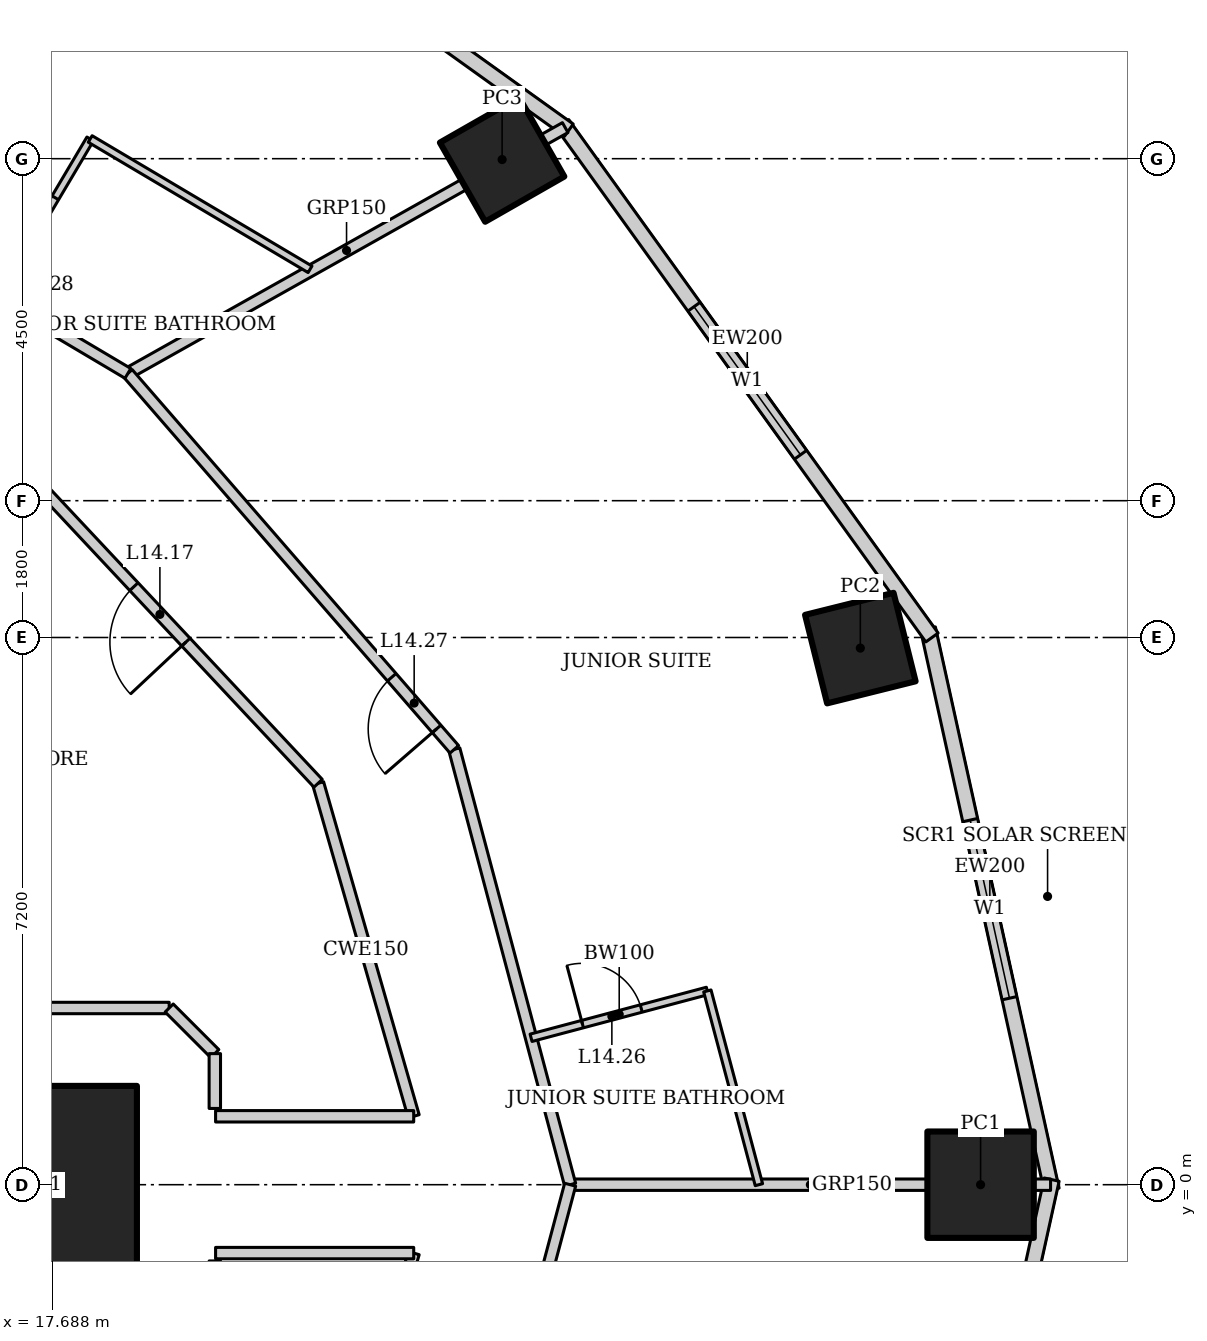
"""IFC4 building model, lengths in metres.
Left out: names, types, materials, properties, quantities, classifications, styles, units other than length and angle.
Written with IfcOpenShell. Run it as: python <this file> out.ifc"""

import sys

from ifc_helpers import new_model, si_unit, direction, frame, frame_2d, origin, origin_2d, place, context, subcontext, project, spatial, rectangle, hollow_rectangle, extrude, element, fill, save


model = new_model("IFC4")
c1 = context("Model", 3, precision=1e-05, world=origin(), true_north=direction((0.0, 1.0)))
c2 = subcontext(c1, "Body", "Model", "MODEL_VIEW")
j1 = project(units=[si_unit("LENGTHUNIT", "METRE"), si_unit("PLANEANGLEUNIT", "RADIAN")], contexts=[c1])
p1 = place(None, origin())
s1 = spatial("IfcSite", under=j1, at=p1, CompositionType="ELEMENT")
p2 = place(p1, origin())
s2 = spatial("IfcBuilding", under=s1, at=p2, CompositionType="ELEMENT")
p3 = place(p2, frame((0.0, 0.0, 65.8)))
s3 = spatial("IfcBuildingStorey", under=s2, at=p3, CompositionType="ELEMENT", Elevation=65.8)
p4 = place(p3, frame((17.5, 0.0, 0.0), z_axis=(0.0, 0.0, 1.0), x_axis=(1.0, 0.0, 0.0)))
e1 = element("IfcColumn", 1, at=p4, inside=s3, PredefinedType="COLUMN", context=c2, shape_type="SweptSolid", body=[
    extrude(hollow_rectangle(XDim=2.6, YDim=2.6, WallThickness=0.13, at=origin_2d()), origin(), (0.0, 0.0, 1.0), 3.6),
])
p5 = place(p3, frame((29.9, 0.0, 0.0), z_axis=(0.0, 0.0, 1.0), x_axis=(1.0, 0.0, 0.0)))
e2 = element("IfcColumn", 2, at=p5, inside=s3, PredefinedType="COLUMN", context=c2, shape_type="SweptSolid", body=[
    extrude(hollow_rectangle(XDim=1.4, YDim=1.4, WallThickness=0.1, at=origin_2d()), origin(), (0.0, 0.0, 1.0), 3.6),
])
p6 = place(p3, frame((28.318, 7.06, 0.0), z_axis=(0.0, 0.0, 1.0), x_axis=(0.970295726276, 0.2419218956, 0.0)))
e3 = element("IfcColumn", 3, at=p6, inside=s3, PredefinedType="COLUMN", context=c2, shape_type="SweptSolid", body=[
    extrude(hollow_rectangle(XDim=1.2, YDim=1.2, WallThickness=0.1, at=origin_2d()), origin(), (0.0, 0.0, 1.0), 3.6),
])
p7 = place(p3, frame((23.605, 13.489, 0.0), z_axis=(0.0, 0.0, 1.0), x_axis=(0.86824298017, 0.496139221777, 0.0)))
e4 = element("IfcColumn", 4, at=p7, inside=s3, PredefinedType="COLUMN", context=c2, shape_type="SweptSolid", body=[
    extrude(hollow_rectangle(XDim=1.2, YDim=1.2, WallThickness=0.12, at=origin_2d()), origin(), (0.0, 0.0, 1.0), 3.6),
])
p8 = place(p3, frame((30.835, -0.067, 0.0), z_axis=(0.0, 0.0, 1.0), x_axis=(-0.215238065514, 0.976561608478, 0.0)))
e5 = element("IfcWall", 5, at=p8, inside=s3, PredefinedType="SOLIDWALL", context=c2, shape_type="SweptSolid", body=[
    extrude(rectangle(XDim=7.562, YDim=0.2, at=frame_2d((3.781, 0.0))), origin(), (0.0, 0.0, 1.0), 3.4),
])
p9 = place(p8, frame((2.581, 0.0, 0.5)))
e6 = element("IfcOpeningElement", 6, at=p9, cuts=e5, PredefinedType="OPENING", context=c2, shape_type="SweptSolid", body=[
    extrude(rectangle(XDim=2.4, YDim=2.2, at=frame_2d((1.2, 1.1))), frame((0.0, 0.11, 0.0), z_axis=(0.0, -1.0, 0.0), x_axis=(1.0, 0.0, 0.0)), (0.0, 0.0, 1.0), 0.22),
])
p10 = place(p3, frame((29.26, 7.2, 0.0), z_axis=(0.0, 0.0, 1.0), x_axis=(-0.583937613703, 0.811798536155, 0.0)))
e7 = element("IfcWall", 7, at=p10, inside=s3, PredefinedType="SOLIDWALL", context=c2, shape_type="SweptSolid", body=[
    extrude(rectangle(XDim=8.323, YDim=0.2, at=frame_2d((4.162, 0.0))), origin(), (0.0, 0.0, 1.0), 3.4),
])
p11 = place(p10, frame((2.961, 0.0, 0.5)))
e8 = element("IfcOpeningElement", 8, at=p11, cuts=e7, PredefinedType="OPENING", context=c2, shape_type="SweptSolid", body=[
    extrude(rectangle(XDim=2.4, YDim=2.2, at=frame_2d((1.2, 1.1))), frame((0.0, 0.11, 0.0), z_axis=(0.0, -1.0, 0.0), x_axis=(1.0, 0.0, 0.0)), (0.0, 0.0, 1.0), 0.22),
])
p12 = place(p3, frame((24.482, 13.875, 0.0), z_axis=(0.0, 0.0, 1.0), x_axis=(-0.812791321576, 0.582554948112, 0.0)))
e9 = element("IfcWall", 9, at=p12, inside=s3, PredefinedType="SOLIDWALL", context=c2, shape_type="SweptSolid", body=[
    extrude(rectangle(XDim=8.063, YDim=0.2, at=frame_2d((4.032, 0.0))), origin(), (0.0, 0.0, 1.0), 3.4),
])
p13 = place(p12, frame((2.832, 0.0, 0.5)))
e10 = element("IfcOpeningElement", 10, at=p13, cuts=e9, PredefinedType="OPENING", context=c2, shape_type="SweptSolid", body=[
    extrude(rectangle(XDim=2.4, YDim=2.2, at=frame_2d((1.2, 1.1))), frame((0.0, 0.11, 0.0), z_axis=(0.0, -1.0, 0.0), x_axis=(1.0, 0.0, 0.0)), (0.0, 0.0, 1.0), 0.22),
])
p14 = place(p3, frame((29.208, -7.318, 0.0), z_axis=(0.0, 0.0, 1.0), x_axis=(0.215238065514, 0.976561608478, 0.0)))
e11 = element("IfcWall", 11, at=p14, inside=s3, PredefinedType="SOLIDWALL", context=c2, shape_type="SweptSolid", body=[
    extrude(rectangle(XDim=7.562, YDim=0.2, at=frame_2d((3.781, 0.0))), origin(), (0.0, 0.0, 1.0), 3.4),
])
p15 = place(p14, frame((2.581, 0.0, 0.5)))
e12 = element("IfcOpeningElement", 12, at=p15, cuts=e11, PredefinedType="OPENING", context=c2, shape_type="SweptSolid", body=[
    extrude(rectangle(XDim=2.4, YDim=2.2, at=frame_2d((1.2, 1.1))), frame((0.0, 0.11, 0.0), z_axis=(0.0, -1.0, 0.0), x_axis=(1.0, 0.0, 0.0)), (0.0, 0.0, 1.0), 0.22),
])
p16 = place(p3, frame((30.821, 0.0, 0.0), z_axis=(0.0, 0.0, 1.0), x_axis=(-1.0, 0.0, 0.0)))
e13 = element("IfcWall", 13, at=p16, inside=s3, PredefinedType="PARTITIONING", context=c2, shape_type="SweptSolid", body=[
    extrude(rectangle(XDim=6.321, YDim=0.15, at=frame_2d((3.16, 0.0))), origin(), (0.0, 0.0, 1.0), 2.528),
])
p17 = place(p3, frame((24.435, 13.909, 0.0), z_axis=(0.0, 0.0, 1.0), x_axis=(-0.871747379892, -0.489955616001, 0.0)))
e14 = element("IfcWall", 14, at=p17, inside=s3, PredefinedType="PARTITIONING", context=c2, shape_type="SweptSolid", body=[
    extrude(rectangle(XDim=6.6, YDim=0.15, at=frame_2d((3.3, 0.0))), origin(), (0.0, 0.0, 1.0), 2.693),
])
p18 = place(p3, frame((24.5, 0.0, 0.0), z_axis=(0.0, 0.0, 1.0), x_axis=(-0.257083265334, 0.966389256296, 0.0)))
e15 = element("IfcWall", 15, at=p18, inside=s3, PredefinedType="PARTITIONING", context=c2, shape_type="SweptSolid", body=[
    extrude(rectangle(XDim=5.928, YDim=0.15, at=frame_2d((2.964, 0.0))), origin(), (0.0, 0.0, 1.0), 3.45),
])
p19 = place(p3, frame((22.976, 5.729, 0.0), z_axis=(0.0, 0.0, 1.0), x_axis=(-0.655599989166, 0.755108372491, 0.0)))
e16 = element("IfcWall", 16, at=p19, inside=s3, PredefinedType="PARTITIONING", context=c2, shape_type="SweptSolid", body=[
    extrude(rectangle(XDim=6.551, YDim=0.15, at=frame_2d((3.275, 0.0))), origin(), (0.0, 0.0, 1.0), 3.45),
])
p20 = place(p19, frame((0.356, 0.0, 0.0)))
e17 = element("IfcOpeningElement", 17, at=p20, cuts=e16, PredefinedType="OPENING", context=c2, shape_type="SweptSolid", body=[
    extrude(rectangle(XDim=0.9, YDim=2.1, at=frame_2d((0.45, 1.05))), frame((0.0, 0.085, 0.0), z_axis=(0.0, -1.0, 0.0), x_axis=(1.0, 0.0, 0.0)), (0.0, 0.0, 1.0), 0.17),
])
p21 = place(p3, frame((18.681, 10.675, 0.0), z_axis=(0.0, 0.0, 1.0), x_axis=(-0.860147339762, 0.510045639036, 0.0)))
e18 = element("IfcWall", 18, at=p21, inside=s3, PredefinedType="PARTITIONING", context=c2, shape_type="SweptSolid", body=[
    extrude(rectangle(XDim=6.19, YDim=0.15, at=frame_2d((3.095, 0.0))), origin(), (0.0, 0.0, 1.0), 3.45),
])
p22 = place(p3, frame((22.976, -5.729, 0.0), z_axis=(0.0, 0.0, 1.0), x_axis=(0.257083265334, 0.966389256296, 0.0)))
e19 = element("IfcWall", 19, at=p22, inside=s3, PredefinedType="PARTITIONING", context=c2, shape_type="SweptSolid", body=[
    extrude(rectangle(XDim=5.928, YDim=0.15, at=frame_2d((2.964, 0.0))), origin(), (0.0, 0.0, 1.0), 3.45),
])
p23 = place(p22, frame((1.794, 0.0, 0.0)))
e20 = element("IfcOpeningElement", 20, at=p23, cuts=e19, PredefinedType="OPENING", context=c2, shape_type="SweptSolid", body=[
    extrude(rectangle(XDim=0.9, YDim=2.1, at=frame_2d((0.45, 1.05))), frame((0.0, 0.085, 0.0), z_axis=(0.0, -1.0, 0.0), x_axis=(1.0, 0.0, 0.0)), (0.0, 0.0, 1.0), 0.17),
])
p24 = place(p3, frame((22.442, 0.9, 0.0), z_axis=(0.0, 0.0, 1.0), x_axis=(-0.27585972825, 0.961197903831, 0.0)))
e21 = element("IfcWall", 21, at=p24, inside=s3, PredefinedType="PARTITIONING", context=c2, shape_type="SweptSolid", body=[
    extrude(rectangle(XDim=4.559, YDim=0.15, at=frame_2d((2.279, 0.0))), origin(), (0.0, 0.0, 1.0), 3.45),
])
p25 = place(p3, frame((21.184, 5.282, 0.0), z_axis=(0.0, 0.0, 1.0), x_axis=(-0.68365836236, 0.729802194828, 0.0)))
e22 = element("IfcWall", 22, at=p25, inside=s3, PredefinedType="PARTITIONING", context=c2, shape_type="SweptSolid", body=[
    extrude(rectangle(XDim=6.09, YDim=0.15, at=frame_2d((3.045, 0.0))), origin(), (0.0, 0.0, 1.0), 3.45),
])
p26 = place(p25, frame((2.545, 0.0, 0.0)))
e23 = element("IfcOpeningElement", 23, at=p26, cuts=e22, PredefinedType="OPENING", context=c2, shape_type="SweptSolid", body=[
    extrude(rectangle(XDim=1.0, YDim=2.1, at=frame_2d((0.5, 1.05))), frame((0.0, 0.085, 0.0), z_axis=(0.0, -1.0, 0.0), x_axis=(1.0, 0.0, 0.0)), (0.0, 0.0, 1.0), 0.17),
])
p27 = place(p3, frame((21.184, -5.282, 0.0), z_axis=(0.0, 0.0, 1.0), x_axis=(0.27585972825, 0.961197903831, 0.0)))
e24 = element("IfcWall", 24, at=p27, inside=s3, PredefinedType="PARTITIONING", context=c2, shape_type="SweptSolid", body=[
    extrude(rectangle(XDim=4.559, YDim=0.15, at=frame_2d((2.279, 0.0))), origin(), (0.0, 0.0, 1.0), 3.45),
])
p28 = place(p3, frame((23.986, 1.933, 0.0), z_axis=(0.0, 0.0, 1.0), x_axis=(0.96639514992, 0.257061109879, 0.0)))
e25 = element("IfcWall", 25, at=p28, inside=s3, PredefinedType="PARTITIONING", context=c2, shape_type="SweptSolid", body=[
    extrude(rectangle(XDim=2.4, YDim=0.1, at=frame_2d((1.2, 0.0))), origin(), (0.0, 0.0, 1.0), 3.45),
])
p29 = place(p28, frame((0.7, 0.0, 0.0)))
e26 = element("IfcOpeningElement", 26, at=p29, cuts=e25, PredefinedType="OPENING", context=c2, shape_type="SweptSolid", body=[
    extrude(rectangle(XDim=0.8, YDim=2.1, at=frame_2d((0.4, 1.05))), frame((0.0, 0.06, 0.0), z_axis=(0.0, -1.0, 0.0), x_axis=(1.0, 0.0, 0.0)), (0.0, 0.0, 1.0), 0.12),
])
p30 = place(p3, frame((26.305, 2.55, 0.0), z_axis=(0.0, 0.0, 1.0), x_axis=(0.257052122515, -0.966397540513, 0.0)))
e27 = element("IfcWall", 27, at=p30, inside=s3, PredefinedType="PARTITIONING", context=c2, shape_type="SweptSolid", body=[
    extrude(rectangle(XDim=2.638, YDim=0.1, at=frame_2d((1.319, 0.0))), origin(), (0.0, 0.0, 1.0), 3.45),
])
p31 = place(p3, frame((16.961, 11.695, 0.0), z_axis=(0.0, 0.0, 1.0), x_axis=(0.510075642074, 0.860129548012, 0.0)))
e28 = element("IfcWall", 28, at=p31, inside=s3, PredefinedType="PARTITIONING", context=c2, shape_type="SweptSolid", body=[
    extrude(rectangle(XDim=2.4, YDim=0.1, at=frame_2d((1.2, 0.0))), origin(), (0.0, 0.0, 1.0), 3.45),
])
p32 = place(p31, frame((0.7, 0.0, 0.0)))
e29 = element("IfcOpeningElement", 29, at=p32, cuts=e28, PredefinedType="OPENING", context=c2, shape_type="SweptSolid", body=[
    extrude(rectangle(XDim=0.8, YDim=2.1, at=frame_2d((0.4, 1.05))), frame((0.0, 0.06, 0.0), z_axis=(0.0, -1.0, 0.0), x_axis=(1.0, 0.0, 0.0)), (0.0, 0.0, 1.0), 0.12),
])
p33 = place(p3, frame((18.185, 13.76, 0.0), z_axis=(0.0, 0.0, 1.0), x_axis=(0.860146437071, -0.510047161343, 0.0)))
e30 = element("IfcWall", 30, at=p33, inside=s3, PredefinedType="PARTITIONING", context=c2, shape_type="SweptSolid", body=[
    extrude(rectangle(XDim=3.363, YDim=0.1, at=frame_2d((1.681, 0.0))), origin(), (0.0, 0.0, 1.0), 3.45),
])
for number, where, z_axis, x_axis in (
    (31, (19.835, -0.9, 0.0), (0.0, 0.0, 1.0), (1.0, 0.0, 0.0)),
    (32, (19.835, 0.9, 0.0), (0.0, 0.0, 1.0), (1.0, 0.0, 0.0)),
):
    element("IfcWall", number, at=place(p3, frame(where, z_axis=z_axis, x_axis=x_axis)), inside=s3, PredefinedType="PARTITIONING", context=c2, shape_type="SweptSolid", body=[
        extrude(rectangle(XDim=2.607, YDim=0.15, at=frame_2d((1.303, 0.0))), origin(), (0.0, 0.0, 1.0), 3.45),
    ])
p34 = place(p3, frame((15.775, 2.325, 0.0), z_axis=(0.0, 0.0, 1.0), x_axis=(1.0, 0.0, 0.0)))
e33 = element("IfcWall", 33, at=p34, inside=s3, PredefinedType="PARTITIONING", context=c2, shape_type="SweptSolid", body=[
    extrude(rectangle(XDim=3.449, YDim=0.15, at=frame_2d((1.725, 0.0))), origin(), (0.0, 0.0, 1.0), 3.45),
])
p35 = place(p3, frame((19.225, 2.325, 0.0), z_axis=(0.0, 0.0, 1.0), x_axis=(0.707106781187, -0.707106781187, 0.0)))
e34 = element("IfcWall", 34, at=p35, inside=s3, PredefinedType="PARTITIONING", context=c2, shape_type="SweptSolid", body=[
    extrude(rectangle(XDim=0.849, YDim=0.15, at=frame_2d((0.425, 0.0))), origin(), (0.0, 0.0, 1.0), 3.45),
])
p36 = place(p3, frame((19.825, 1.725, 0.0), z_axis=(0.0, 0.0, 1.0), x_axis=(0.0, -1.0, 0.0)))
e35 = element("IfcWall", 35, at=p36, inside=s3, PredefinedType="PARTITIONING", context=c2, shape_type="SweptSolid", body=[
    extrude(rectangle(XDim=0.721, YDim=0.15, at=frame_2d((0.361, 0.0))), origin(), (0.0, 0.0, 1.0), 3.45),
])
p37 = place(p9, origin())
e36 = element("IfcWindow", 36, at=p37, inside=s3, PartitioningType="SINGLE_PANEL", PredefinedType="WINDOW", context=c2, shape_type="SweptSolid", body=[
    extrude(rectangle(XDim=2.4, YDim=2.2, at=frame_2d((1.2, 1.1))), frame((0.0, 0.03, 0.0), z_axis=(0.0, -1.0, 0.0), x_axis=(1.0, 0.0, 0.0)), (0.0, 0.0, 1.0), 0.06),
])
fill(e6, e36)
p38 = place(p11, origin())
e37 = element("IfcWindow", 37, at=p38, inside=s3, PartitioningType="SINGLE_PANEL", PredefinedType="WINDOW", context=c2, shape_type="SweptSolid", body=[
    extrude(rectangle(XDim=2.4, YDim=2.2, at=frame_2d((1.2, 1.1))), frame((0.0, 0.03, 0.0), z_axis=(0.0, -1.0, 0.0), x_axis=(1.0, 0.0, 0.0)), (0.0, 0.0, 1.0), 0.06),
])
fill(e8, e37)
p39 = place(p26, origin())
e38 = element("IfcDoor", 38, at=p39, inside=s3, OperationType="SINGLE_SWING_LEFT", PredefinedType="DOOR", context=c2, shape_type="SweptSolid", body=[
    extrude(rectangle(XDim=1.0, YDim=2.1, at=frame_2d((0.5, 1.05))), frame((0.0, 0.025, 0.0), z_axis=(0.0, -1.0, 0.0), x_axis=(1.0, 0.0, 0.0)), (0.0, 0.0, 1.0), 0.05),
])
fill(e23, e38)
p40 = place(p29, origin())
e39 = element("IfcDoor", 39, at=p40, inside=s3, OperationType="SINGLE_SWING_LEFT", PredefinedType="DOOR", context=c2, shape_type="SweptSolid", body=[
    extrude(rectangle(XDim=0.8, YDim=2.1, at=frame_2d((0.4, 1.05))), frame((0.0, 0.025, 0.0), z_axis=(0.0, -1.0, 0.0), x_axis=(1.0, 0.0, 0.0)), (0.0, 0.0, 1.0), 0.05),
])
fill(e26, e39)
p41 = place(p20, origin())
e40 = element("IfcDoor", 40, at=p41, inside=s3, OperationType="SINGLE_SWING_LEFT", PredefinedType="DOOR", context=c2, shape_type="SweptSolid", body=[
    extrude(rectangle(XDim=0.9, YDim=2.1, at=frame_2d((0.45, 1.05))), frame((0.0, 0.025, 0.0), z_axis=(0.0, -1.0, 0.0), x_axis=(1.0, 0.0, 0.0)), (0.0, 0.0, 1.0), 0.05),
])
fill(e17, e40)
p42 = place(p32, origin())
e41 = element("IfcDoor", 41, at=p42, inside=s3, OperationType="SINGLE_SWING_LEFT", PredefinedType="DOOR", context=c2, shape_type="SweptSolid", body=[
    extrude(rectangle(XDim=0.8, YDim=2.1, at=frame_2d((0.4, 1.05))), frame((0.0, 0.025, 0.0), z_axis=(0.0, -1.0, 0.0), x_axis=(1.0, 0.0, 0.0)), (0.0, 0.0, 1.0), 0.05),
])
fill(e29, e41)
save(model, sys.argv[1])
